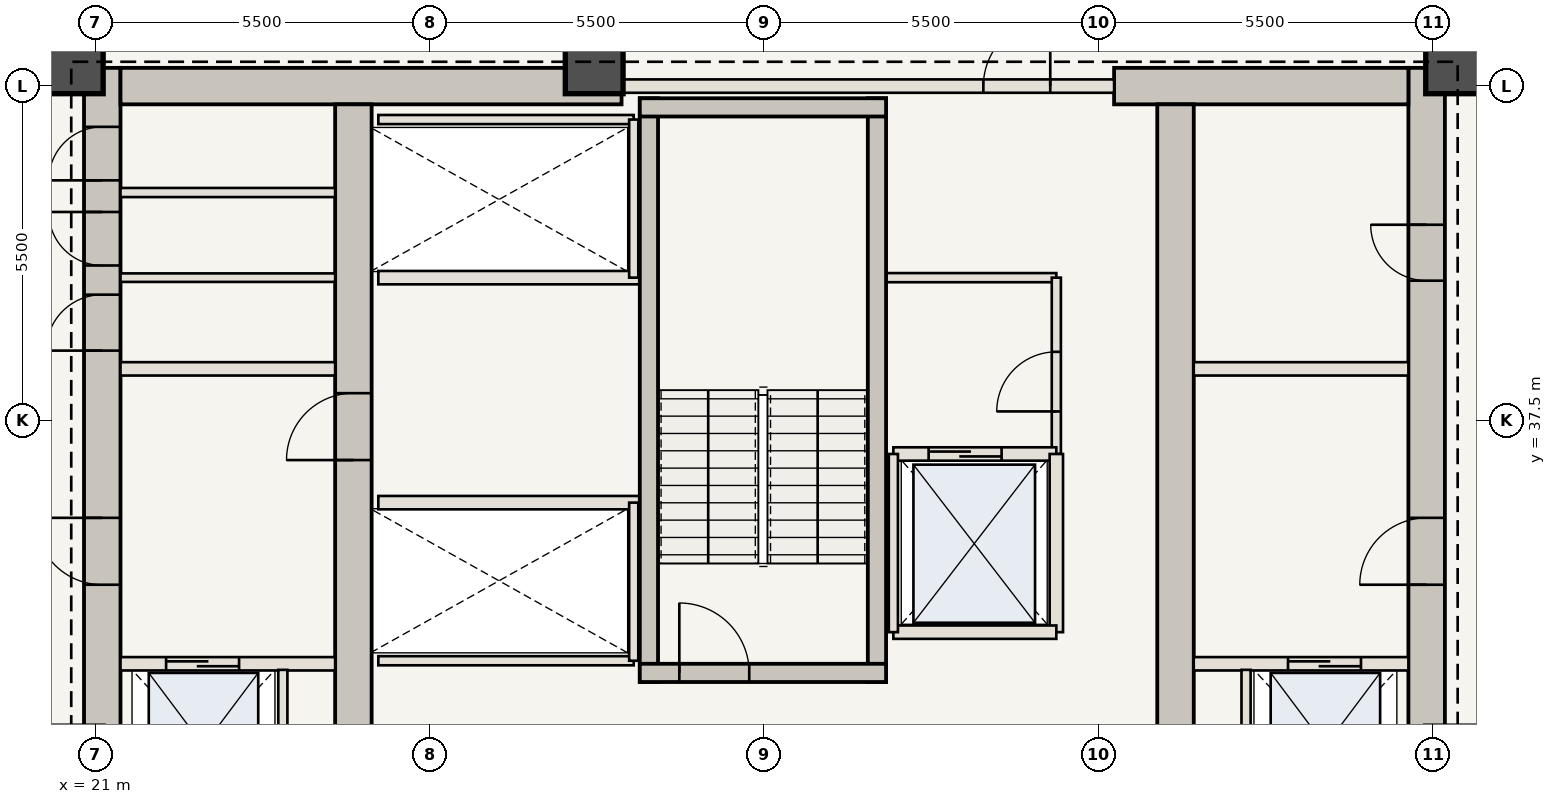
"""IFC4 building model, lengths in metres.
Left out: names, types, materials, properties, quantities, classifications, styles, units other than length and angle.
Written with IfcOpenShell. Run it as: python <this file> out.ifc"""

import sys

from ifc_helpers import new_model, si_unit, direction, frame, frame_2d, origin, origin_2d, place, context, subcontext, project, spatial, rectangle, extrude, element, fill, save


model = new_model("IFC4")
c1 = context("Model", 3, precision=1e-05, world=origin(), true_north=direction((0.0, 1.0)))
c2 = subcontext(c1, "Body", "Model", "MODEL_VIEW")
j1 = project(units=[si_unit("LENGTHUNIT", "METRE"), si_unit("PLANEANGLEUNIT", "RADIAN")], contexts=[c1])
p1 = place(None, origin())
s1 = spatial("IfcSite", under=j1, at=p1, CompositionType="ELEMENT")
p2 = place(p1, origin())
s2 = spatial("IfcBuilding", under=s1, at=p2, CompositionType="ELEMENT")
p3 = place(p2, frame((0.0, 0.0, 145.25)))
s3 = spatial("IfcBuildingStorey", under=s2, at=p3, CompositionType="ELEMENT", Elevation=145.25)
p4 = place(p3, frame((21.11, 30.6, 0.0), z_axis=(0.0, 0.0, 1.0), x_axis=(0.0, 1.0, 0.0)))
e1 = element("IfcWall", 1, at=p4, inside=s3, PredefinedType="SHEAR", context=c2, shape_type="SweptSolid", body=[
    extrude(rectangle(XDim=12.7, YDim=0.6, at=frame_2d((6.35, 0.0))), origin(), (0.0, 0.0, 1.0), 3.85),
])
p5 = place(p4, frame((4.2, 0.0, 0.0)))
e2 = element("IfcOpeningElement", 2, at=p5, cuts=e1, PredefinedType="OPENING", context=c2, shape_type="SweptSolid", body=[
    extrude(rectangle(XDim=1.1, YDim=2.15, at=frame_2d((0.55, 1.075))), frame((0.0, 0.31, 0.0), z_axis=(0.0, -1.0, 0.0), x_axis=(1.0, 0.0, 0.0)), (0.0, 0.0, 1.0), 0.62),
])
p6 = place(p4, frame((8.05, 0.0, 0.0)))
e3 = element("IfcOpeningElement", 3, at=p6, cuts=e1, PredefinedType="OPENING", context=c2, shape_type="SweptSolid", body=[
    extrude(rectangle(XDim=0.92, YDim=2.1, at=frame_2d((0.46, 1.05))), frame((0.0, 0.31, 0.0), z_axis=(0.0, -1.0, 0.0), x_axis=(1.0, 0.0, 0.0)), (0.0, 0.0, 1.0), 0.62),
])
p7 = place(p4, frame((9.45, 0.0, 0.0)))
e4 = element("IfcOpeningElement", 4, at=p7, cuts=e1, PredefinedType="OPENING", context=c2, shape_type="SweptSolid", body=[
    extrude(rectangle(XDim=0.88, YDim=2.1, at=frame_2d((0.44, 1.05))), frame((0.0, 0.31, 0.0), z_axis=(0.0, -1.0, 0.0), x_axis=(1.0, 0.0, 0.0)), (0.0, 0.0, 1.0), 0.62),
])
p8 = place(p4, frame((10.85, 0.0, 0.0)))
e5 = element("IfcOpeningElement", 5, at=p8, cuts=e1, PredefinedType="OPENING", context=c2, shape_type="SweptSolid", body=[
    extrude(rectangle(XDim=0.88, YDim=2.1, at=frame_2d((0.44, 1.05))), frame((0.0, 0.31, 0.0), z_axis=(0.0, -1.0, 0.0), x_axis=(1.0, 0.0, 0.0)), (0.0, 0.0, 1.0), 0.62),
])
p9 = place(p3, frame((42.89, 30.6, 0.0), z_axis=(0.0, 0.0, 1.0), x_axis=(0.0, 1.0, 0.0)))
e6 = element("IfcWall", 6, at=p9, inside=s3, PredefinedType="SHEAR", context=c2, shape_type="SweptSolid", body=[
    extrude(rectangle(XDim=12.7, YDim=0.6, at=frame_2d((6.35, 0.0))), origin(), (0.0, 0.0, 1.0), 3.85),
])
p10 = place(p9, frame((4.2, 0.0, 0.0)))
e7 = element("IfcOpeningElement", 7, at=p10, cuts=e6, PredefinedType="OPENING", context=c2, shape_type="SweptSolid", body=[
    extrude(rectangle(XDim=1.1, YDim=2.15, at=frame_2d((0.55, 1.075))), frame((0.0, 0.31, 0.0), z_axis=(0.0, -1.0, 0.0), x_axis=(1.0, 0.0, 0.0)), (0.0, 0.0, 1.0), 0.62),
])
p11 = place(p9, frame((9.2, 0.0, 0.0)))
e8 = element("IfcOpeningElement", 8, at=p11, cuts=e6, PredefinedType="OPENING", context=c2, shape_type="SweptSolid", body=[
    extrude(rectangle(XDim=0.92, YDim=2.1, at=frame_2d((0.46, 1.05))), frame((0.0, 0.31, 0.0), z_axis=(0.0, -1.0, 0.0), x_axis=(1.0, 0.0, 0.0)), (0.0, 0.0, 1.0), 0.62),
])
p12 = place(p3, frame((21.41, 43.0, 0.0), z_axis=(0.0, 0.0, 1.0), x_axis=(1.0, 0.0, 0.0)))
e9 = element("IfcWall", 9, at=p12, inside=s3, PredefinedType="SHEAR", context=c2, shape_type="SweptSolid", body=[
    extrude(rectangle(XDim=8.24, YDim=0.6, at=frame_2d((4.12, 0.0))), origin(), (0.0, 0.0, 1.0), 3.85),
])
p13 = place(p3, frame((37.75, 43.0, 0.0), z_axis=(0.0, 0.0, 1.0), x_axis=(1.0, 0.0, 0.0)))
e10 = element("IfcWall", 10, at=p13, inside=s3, PredefinedType="SHEAR", context=c2, shape_type="SweptSolid", body=[
    extrude(rectangle(XDim=4.84, YDim=0.6, at=frame_2d((2.42, 0.0))), origin(), (0.0, 0.0, 1.0), 3.85),
])
p14 = place(p3, frame((25.24, 30.6, 0.0), z_axis=(0.0, 0.0, 1.0), x_axis=(0.0, 1.0, 0.0)))
e11 = element("IfcWall", 11, at=p14, inside=s3, PredefinedType="SHEAR", context=c2, shape_type="SweptSolid", body=[
    extrude(rectangle(XDim=12.1, YDim=0.6, at=frame_2d((6.05, 0.0))), origin(), (0.0, 0.0, 1.0), 3.85),
])
p15 = place(p14, frame((6.25, 0.0, 0.0)))
e12 = element("IfcOpeningElement", 12, at=p15, cuts=e11, PredefinedType="OPENING", context=c2, shape_type="SweptSolid", body=[
    extrude(rectangle(XDim=1.1, YDim=2.15, at=frame_2d((0.55, 1.075))), frame((0.0, 0.31, 0.0), z_axis=(0.0, -1.0, 0.0), x_axis=(1.0, 0.0, 0.0)), (0.0, 0.0, 1.0), 0.62),
])
p16 = place(p3, frame((38.76, 30.6, 0.0), z_axis=(0.0, 0.0, 1.0), x_axis=(0.0, 1.0, 0.0)))
e13 = element("IfcWall", 13, at=p16, inside=s3, PredefinedType="SHEAR", context=c2, shape_type="SweptSolid", body=[
    extrude(rectangle(XDim=12.1, YDim=0.6, at=frame_2d((6.05, 0.0))), origin(), (0.0, 0.0, 1.0), 3.85),
])
for number, where, z_axis, x_axis in (
    (14, (43.35, 43.35, 0.0), (0.0, 0.0, 1.0), (1.0, 0.0, 0.0)),
    (15, (29.2, 43.35, 0.0), (0.0, 0.0, 1.0), (1.0, 0.0, 0.0)),
    (16, (20.65, 43.35, 0.0), (0.0, 0.0, 1.0), (1.0, 0.0, 0.0)),
):
    element("IfcColumn", number, at=place(p3, frame(where, z_axis=z_axis, x_axis=x_axis)), inside=s3, PredefinedType="COLUMN", context=c2, shape_type="SweptSolid", body=[
        extrude(rectangle(XDim=0.95, YDim=0.95, at=origin_2d()), origin(), (0.0, 0.0, 1.0), 3.85),
    ])
p17 = place(p3, frame((21.41, 33.5, 0.0), z_axis=(0.0, 0.0, 1.0), x_axis=(1.0, 0.0, 0.0)))
e17 = element("IfcWall", 17, at=p17, inside=s3, PredefinedType="STANDARD", context=c2, shape_type="SweptSolid", body=[
    extrude(rectangle(XDim=3.53, YDim=0.22, at=frame_2d((1.765, 0.0))), origin(), (0.0, 0.0, 1.0), 3.685),
])
p18 = place(p17, frame((0.75, 0.0, 0.0)))
e18 = element("IfcOpeningElement", 18, at=p18, cuts=e17, PredefinedType="OPENING", context=c2, shape_type="SweptSolid", body=[
    extrude(rectangle(XDim=1.2, YDim=2.2, at=frame_2d((0.6, 1.1))), frame((0.0, 0.12, 0.0), z_axis=(0.0, -1.0, 0.0), x_axis=(1.0, 0.0, 0.0)), (0.0, 0.0, 1.0), 0.24),
])
p19 = place(p3, frame((24.08, 30.75, 0.0), z_axis=(0.0, 0.0, 1.0), x_axis=(0.0, 1.0, 0.0)))
e19 = element("IfcWall", 19, at=p19, inside=s3, PredefinedType="STANDARD", context=c2, shape_type="SweptSolid", body=[
    extrude(rectangle(XDim=2.65, YDim=0.15, at=frame_2d((1.325, 0.0))), origin(), (0.0, 0.0, 1.0), 3.685),
])
p20 = place(p3, frame((39.06, 33.5, 0.0), z_axis=(0.0, 0.0, 1.0), x_axis=(1.0, 0.0, 0.0)))
e20 = element("IfcWall", 20, at=p20, inside=s3, PredefinedType="STANDARD", context=c2, shape_type="SweptSolid", body=[
    extrude(rectangle(XDim=3.53, YDim=0.22, at=frame_2d((1.765, 0.0))), origin(), (0.0, 0.0, 1.0), 3.685),
])
p21 = place(p20, frame((1.55, 0.0, 0.0)))
e21 = element("IfcOpeningElement", 21, at=p21, cuts=e20, PredefinedType="OPENING", context=c2, shape_type="SweptSolid", body=[
    extrude(rectangle(XDim=1.2, YDim=2.2, at=frame_2d((0.6, 1.1))), frame((0.0, 0.12, 0.0), z_axis=(0.0, -1.0, 0.0), x_axis=(1.0, 0.0, 0.0)), (0.0, 0.0, 1.0), 0.24),
])
p22 = place(p3, frame((39.92, 30.75, 0.0), z_axis=(0.0, 0.0, 1.0), x_axis=(0.0, 1.0, 0.0)))
e22 = element("IfcWall", 22, at=p22, inside=s3, PredefinedType="STANDARD", context=c2, shape_type="SweptSolid", body=[
    extrude(rectangle(XDim=2.65, YDim=0.15, at=frame_2d((1.325, 0.0))), origin(), (0.0, 0.0, 1.0), 3.685),
])
for number, where, z_axis, x_axis in (
    (23, (21.41, 38.35, 0.0), (0.0, 0.0, 1.0), (1.0, 0.0, 0.0)),
    (24, (39.06, 38.35, 0.0), (0.0, 0.0, 1.0), (1.0, 0.0, 0.0)),
):
    element("IfcWall", number, at=place(p3, frame(where, z_axis=z_axis, x_axis=x_axis)), inside=s3, PredefinedType="STANDARD", context=c2, shape_type="SweptSolid", body=[
        extrude(rectangle(XDim=3.53, YDim=0.22, at=frame_2d((1.765, 0.0))), origin(), (0.0, 0.0, 1.0), 3.685),
    ])
p23 = place(p3, frame((21.41, 39.85, 0.0), z_axis=(0.0, 0.0, 1.0), x_axis=(1.0, 0.0, 0.0)))
e25 = element("IfcWall", 25, at=p23, inside=s3, PredefinedType="STANDARD", context=c2, shape_type="SweptSolid", body=[
    extrude(rectangle(XDim=3.53, YDim=0.14, at=frame_2d((1.765, 0.0))), origin(), (0.0, 0.0, 1.0), 3.685),
])
p24 = place(p3, frame((21.41, 41.25, 0.0), z_axis=(0.0, 0.0, 1.0), x_axis=(1.0, 0.0, 0.0)))
e26 = element("IfcWall", 26, at=p24, inside=s3, PredefinedType="STANDARD", context=c2, shape_type="SweptSolid", body=[
    extrude(rectangle(XDim=3.53, YDim=0.15, at=frame_2d((1.765, 0.0))), origin(), (0.0, 0.0, 1.0), 3.685),
])
p25 = place(p3, frame((34.0, 39.85, 0.0), z_axis=(0.0, 0.0, 1.0), x_axis=(1.0, 0.0, 0.0)))
e27 = element("IfcWall", 27, at=p25, inside=s3, PredefinedType="STANDARD", context=c2, shape_type="SweptSolid", body=[
    extrude(rectangle(XDim=2.8, YDim=0.15, at=frame_2d((1.4, 0.0))), origin(), (0.0, 0.0, 1.0), 3.685),
])
p26 = place(p3, frame((36.8, 36.95, 0.0), z_axis=(0.0, 0.0, 1.0), x_axis=(0.0, 1.0, 0.0)))
e28 = element("IfcWall", 28, at=p26, inside=s3, PredefinedType="STANDARD", context=c2, shape_type="SweptSolid", body=[
    extrude(rectangle(XDim=2.9, YDim=0.15, at=frame_2d((1.45, 0.0))), origin(), (0.0, 0.0, 1.0), 3.685),
])
p27 = place(p26, frame((0.7, 0.0, 0.0)))
e29 = element("IfcOpeningElement", 29, at=p27, cuts=e28, PredefinedType="OPENING", context=c2, shape_type="SweptSolid", body=[
    extrude(rectangle(XDim=0.98, YDim=2.2, at=frame_2d((0.49, 1.1))), frame((0.0, 0.085, 0.0), z_axis=(0.0, -1.0, 0.0), x_axis=(1.0, 0.0, 0.0)), (0.0, 0.0, 1.0), 0.17),
])
p28 = place(p3, frame((25.65, 36.15, 0.0), z_axis=(0.0, 0.0, 1.0), x_axis=(1.0, 0.0, 0.0)))
e30 = element("IfcWall", 30, at=p28, inside=s3, PredefinedType="STANDARD", context=c2, shape_type="SweptSolid", body=[
    extrude(rectangle(XDim=4.3, YDim=0.22, at=frame_2d((2.15, 0.0))), origin(), (0.0, 0.0, 1.0), 3.685),
])
p29 = place(p3, frame((25.65, 33.55, 0.0), z_axis=(0.0, 0.0, 1.0), x_axis=(1.0, 0.0, 0.0)))
e31 = element("IfcWall", 31, at=p29, inside=s3, PredefinedType="STANDARD", context=c2, shape_type="SweptSolid", body=[
    extrude(rectangle(XDim=4.2, YDim=0.15, at=frame_2d((2.1, 0.0))), origin(), (0.0, 0.0, 1.0), 3.685),
])
p30 = place(p3, frame((29.85, 33.55, 0.0), z_axis=(0.0, 0.0, 1.0), x_axis=(0.0, 1.0, 0.0)))
e32 = element("IfcWall", 32, at=p30, inside=s3, PredefinedType="STANDARD", context=c2, shape_type="SweptSolid", body=[
    extrude(rectangle(XDim=2.6, YDim=0.15, at=frame_2d((1.3, 0.0))), origin(), (0.0, 0.0, 1.0), 3.685),
])
p31 = place(p3, frame((25.65, 39.85, 0.0), z_axis=(0.0, 0.0, 1.0), x_axis=(1.0, 0.0, 0.0)))
e33 = element("IfcWall", 33, at=p31, inside=s3, PredefinedType="STANDARD", context=c2, shape_type="SweptSolid", body=[
    extrude(rectangle(XDim=4.3, YDim=0.22, at=frame_2d((2.15, 0.0))), origin(), (0.0, 0.0, 1.0), 3.685),
])
p32 = place(p3, frame((25.65, 42.45, 0.0), z_axis=(0.0, 0.0, 1.0), x_axis=(1.0, 0.0, 0.0)))
e34 = element("IfcWall", 34, at=p32, inside=s3, PredefinedType="STANDARD", context=c2, shape_type="SweptSolid", body=[
    extrude(rectangle(XDim=4.2, YDim=0.15, at=frame_2d((2.1, 0.0))), origin(), (0.0, 0.0, 1.0), 3.685),
])
p33 = place(p3, frame((29.85, 39.85, 0.0), z_axis=(0.0, 0.0, 1.0), x_axis=(0.0, 1.0, 0.0)))
e35 = element("IfcWall", 35, at=p33, inside=s3, PredefinedType="STANDARD", context=c2, shape_type="SweptSolid", body=[
    extrude(rectangle(XDim=2.6, YDim=0.15, at=frame_2d((1.3, 0.0))), origin(), (0.0, 0.0, 1.0), 3.685),
])
for number, where, z_axis, x_axis in (
    (36, (30.1, 33.2, 0.0), (0.0, 0.0, 1.0), (0.0, 1.0, 0.0)),
    (37, (33.85, 33.2, 0.0), (0.0, 0.0, 1.0), (0.0, 1.0, 0.0)),
):
    element("IfcWall", number, at=place(p3, frame(where, z_axis=z_axis, x_axis=x_axis)), inside=s3, PredefinedType="SHEAR", context=c2, shape_type="SweptSolid", body=[
        extrude(rectangle(XDim=9.6, YDim=0.3, at=frame_2d((4.8, 0.0))), origin(), (0.0, 0.0, 1.0), 3.685),
    ])
p34 = place(p3, frame((29.95, 33.35, 0.0), z_axis=(0.0, 0.0, 1.0), x_axis=(1.0, 0.0, 0.0)))
e38 = element("IfcWall", 38, at=p34, inside=s3, PredefinedType="SHEAR", context=c2, shape_type="SweptSolid", body=[
    extrude(rectangle(XDim=4.05, YDim=0.3, at=frame_2d((2.025, 0.0))), origin(), (0.0, 0.0, 1.0), 3.685),
])
p35 = place(p34, frame((0.65, 0.0, 0.0)))
e39 = element("IfcOpeningElement", 39, at=p35, cuts=e38, PredefinedType="OPENING", context=c2, shape_type="SweptSolid", body=[
    extrude(rectangle(XDim=1.15, YDim=2.15, at=frame_2d((0.575, 1.075))), frame((0.0, 0.16, 0.0), z_axis=(0.0, -1.0, 0.0), x_axis=(1.0, 0.0, 0.0)), (0.0, 0.0, 1.0), 0.32),
])
p36 = place(p3, frame((29.95, 42.65, 0.0), z_axis=(0.0, 0.0, 1.0), x_axis=(1.0, 0.0, 0.0)))
e40 = element("IfcWall", 40, at=p36, inside=s3, PredefinedType="SHEAR", context=c2, shape_type="SweptSolid", body=[
    extrude(rectangle(XDim=4.05, YDim=0.3, at=frame_2d((2.025, 0.0))), origin(), (0.0, 0.0, 1.0), 3.685),
])
p37 = place(p3, frame((29.65, 43.0, 0.0), z_axis=(0.0, 0.0, 1.0), x_axis=(1.0, 0.0, 0.0)))
e41 = element("IfcWall", 41, at=p37, inside=s3, PredefinedType="STANDARD", context=c2, shape_type="SweptSolid", body=[
    extrude(rectangle(XDim=8.1, YDim=0.22, at=frame_2d((4.05, 0.0))), origin(), (0.0, 0.0, 1.0), 3.685),
])
p38 = place(p37, frame((5.95, 0.0, 0.0)))
e42 = element("IfcOpeningElement", 42, at=p38, cuts=e41, PredefinedType="OPENING", context=c2, shape_type="SweptSolid", body=[
    extrude(rectangle(XDim=1.1, YDim=2.15, at=frame_2d((0.55, 1.075))), frame((0.0, 0.12, 0.0), z_axis=(0.0, -1.0, 0.0), x_axis=(1.0, 0.0, 0.0)), (0.0, 0.0, 1.0), 0.24),
])
p39 = place(p3, frame((34.12, 36.95, 0.0), z_axis=(0.0, 0.0, 1.0), x_axis=(1.0, 0.0, 0.0)))
e43 = element("IfcWall", 43, at=p39, inside=s3, PredefinedType="STANDARD", context=c2, shape_type="SweptSolid", body=[
    extrude(rectangle(XDim=2.68, YDim=0.22, at=frame_2d((1.34, 0.0))), origin(), (0.0, 0.0, 1.0), 3.685),
])
p40 = place(p39, frame((0.58, 0.0, 0.0)))
e44 = element("IfcOpeningElement", 44, at=p40, cuts=e43, PredefinedType="OPENING", context=c2, shape_type="SweptSolid", body=[
    extrude(rectangle(XDim=1.2, YDim=2.2, at=frame_2d((0.6, 1.1))), frame((0.0, 0.12, 0.0), z_axis=(0.0, -1.0, 0.0), x_axis=(1.0, 0.0, 0.0)), (0.0, 0.0, 1.0), 0.24),
])
p41 = place(p3, frame((36.8, 34.02, 0.0), z_axis=(0.0, 0.0, 1.0), x_axis=(0.0, 1.0, 0.0)))
e45 = element("IfcWall", 45, at=p41, inside=s3, PredefinedType="STANDARD", context=c2, shape_type="SweptSolid", body=[
    extrude(rectangle(XDim=2.93, YDim=0.22, at=frame_2d((1.465, 0.0))), origin(), (0.0, 0.0, 1.0), 3.685),
])
p42 = place(p3, frame((34.12, 34.02, 0.0), z_axis=(0.0, 0.0, 1.0), x_axis=(1.0, 0.0, 0.0)))
e46 = element("IfcWall", 46, at=p42, inside=s3, PredefinedType="STANDARD", context=c2, shape_type="SweptSolid", body=[
    extrude(rectangle(XDim=2.68, YDim=0.22, at=frame_2d((1.34, 0.0))), origin(), (0.0, 0.0, 1.0), 3.685),
])
p43 = place(p3, frame((34.12, 34.02, 0.0), z_axis=(0.0, 0.0, 1.0), x_axis=(0.0, 1.0, 0.0)))
e47 = element("IfcWall", 47, at=p43, inside=s3, PredefinedType="STANDARD", context=c2, shape_type="SweptSolid", body=[
    extrude(rectangle(XDim=2.93, YDim=0.15, at=frame_2d((1.465, 0.0))), origin(), (0.0, 0.0, 1.0), 3.685),
])
p44 = place(p5, origin())
e48 = element("IfcDoor", 48, at=p44, inside=s3, OperationType="SINGLE_SWING_RIGHT", PredefinedType="DOOR", context=c2, shape_type="SweptSolid", body=[
    extrude(rectangle(XDim=1.1, YDim=2.15, at=frame_2d((0.55, 1.075))), frame((0.0, 0.025, 0.0), z_axis=(0.0, -1.0, 0.0), x_axis=(1.0, 0.0, 0.0)), (0.0, 0.0, 1.0), 0.05),
])
fill(e2, e48)
p45 = place(p10, origin())
e49 = element("IfcDoor", 49, at=p45, inside=s3, OperationType="SINGLE_SWING_LEFT", PredefinedType="DOOR", context=c2, shape_type="SweptSolid", body=[
    extrude(rectangle(XDim=1.1, YDim=2.15, at=frame_2d((0.55, 1.075))), frame((0.0, 0.025, 0.0), z_axis=(0.0, -1.0, 0.0), x_axis=(1.0, 0.0, 0.0)), (0.0, 0.0, 1.0), 0.05),
])
fill(e7, e49)
p46 = place(p15, origin())
e50 = element("IfcDoor", 50, at=p46, inside=s3, OperationType="SINGLE_SWING_LEFT", PredefinedType="DOOR", context=c2, shape_type="SweptSolid", body=[
    extrude(rectangle(XDim=1.1, YDim=2.15, at=frame_2d((0.55, 1.075))), frame((0.0, 0.025, 0.0), z_axis=(0.0, -1.0, 0.0), x_axis=(1.0, 0.0, 0.0)), (0.0, 0.0, 1.0), 0.05),
])
fill(e12, e50)
p47 = place(p6, origin())
e51 = element("IfcDoor", 51, at=p47, inside=s3, OperationType="SINGLE_SWING_LEFT", PredefinedType="DOOR", context=c2, shape_type="SweptSolid", body=[
    extrude(rectangle(XDim=0.92, YDim=2.1, at=frame_2d((0.46, 1.05))), frame((0.0, 0.025, 0.0), z_axis=(0.0, -1.0, 0.0), x_axis=(1.0, 0.0, 0.0)), (0.0, 0.0, 1.0), 0.05),
])
fill(e3, e51)
p48 = place(p7, origin())
e52 = element("IfcDoor", 52, at=p48, inside=s3, OperationType="SINGLE_SWING_RIGHT", PredefinedType="DOOR", context=c2, shape_type="SweptSolid", body=[
    extrude(rectangle(XDim=0.88, YDim=2.1, at=frame_2d((0.44, 1.05))), frame((0.0, 0.025, 0.0), z_axis=(0.0, -1.0, 0.0), x_axis=(1.0, 0.0, 0.0)), (0.0, 0.0, 1.0), 0.05),
])
fill(e4, e52)
p49 = place(p8, origin())
e53 = element("IfcDoor", 53, at=p49, inside=s3, OperationType="SINGLE_SWING_LEFT", PredefinedType="DOOR", context=c2, shape_type="SweptSolid", body=[
    extrude(rectangle(XDim=0.88, YDim=2.1, at=frame_2d((0.44, 1.05))), frame((0.0, 0.025, 0.0), z_axis=(0.0, -1.0, 0.0), x_axis=(1.0, 0.0, 0.0)), (0.0, 0.0, 1.0), 0.05),
])
fill(e5, e53)
p50 = place(p11, origin())
e54 = element("IfcDoor", 54, at=p50, inside=s3, OperationType="SINGLE_SWING_RIGHT", PredefinedType="DOOR", context=c2, shape_type="SweptSolid", body=[
    extrude(rectangle(XDim=0.92, YDim=2.1, at=frame_2d((0.46, 1.05))), frame((0.0, 0.025, 0.0), z_axis=(0.0, -1.0, 0.0), x_axis=(1.0, 0.0, 0.0)), (0.0, 0.0, 1.0), 0.05),
])
fill(e8, e54)
p51 = place(p18, origin())
e55 = element("IfcDoor", 55, at=p51, inside=s3, OperationType="DOUBLE_DOOR_SLIDING", PredefinedType="DOOR", context=c2, shape_type="SweptSolid", body=[
    extrude(rectangle(XDim=1.2, YDim=2.2, at=frame_2d((0.6, 1.1))), frame((0.0, 0.025, 0.0), z_axis=(0.0, -1.0, 0.0), x_axis=(1.0, 0.0, 0.0)), (0.0, 0.0, 1.0), 0.05),
])
fill(e18, e55)
p52 = place(p21, origin())
e56 = element("IfcDoor", 56, at=p52, inside=s3, OperationType="DOUBLE_DOOR_SLIDING", PredefinedType="DOOR", context=c2, shape_type="SweptSolid", body=[
    extrude(rectangle(XDim=1.2, YDim=2.2, at=frame_2d((0.6, 1.1))), frame((0.0, 0.025, 0.0), z_axis=(0.0, -1.0, 0.0), x_axis=(1.0, 0.0, 0.0)), (0.0, 0.0, 1.0), 0.05),
])
fill(e21, e56)
p53 = place(p27, origin())
e57 = element("IfcDoor", 57, at=p53, inside=s3, OperationType="SINGLE_SWING_LEFT", PredefinedType="DOOR", context=c2, shape_type="SweptSolid", body=[
    extrude(rectangle(XDim=0.98, YDim=2.2, at=frame_2d((0.49, 1.1))), frame((0.0, 0.025, 0.0), z_axis=(0.0, -1.0, 0.0), x_axis=(1.0, 0.0, 0.0)), (0.0, 0.0, 1.0), 0.05),
])
fill(e29, e57)
p54 = place(p35, origin())
e58 = element("IfcDoor", 58, at=p54, inside=s3, OperationType="SINGLE_SWING_LEFT", PredefinedType="DOOR", context=c2, shape_type="SweptSolid", body=[
    extrude(rectangle(XDim=1.15, YDim=2.15, at=frame_2d((0.575, 1.075))), frame((0.0, 0.025, 0.0), z_axis=(0.0, -1.0, 0.0), x_axis=(1.0, 0.0, 0.0)), (0.0, 0.0, 1.0), 0.05),
])
fill(e39, e58)
p55 = place(p38, origin())
e59 = element("IfcDoor", 59, at=p55, inside=s3, OperationType="SINGLE_SWING_RIGHT", PredefinedType="DOOR", context=c2, shape_type="SweptSolid", body=[
    extrude(rectangle(XDim=1.1, YDim=2.15, at=frame_2d((0.55, 1.075))), frame((0.0, 0.025, 0.0), z_axis=(0.0, -1.0, 0.0), x_axis=(1.0, 0.0, 0.0)), (0.0, 0.0, 1.0), 0.05),
])
fill(e42, e59)
p56 = place(p40, origin())
e60 = element("IfcDoor", 60, at=p56, inside=s3, OperationType="DOUBLE_DOOR_SLIDING", PredefinedType="DOOR", context=c2, shape_type="SweptSolid", body=[
    extrude(rectangle(XDim=1.2, YDim=2.2, at=frame_2d((0.6, 1.1))), frame((0.0, 0.025, 0.0), z_axis=(0.0, -1.0, 0.0), x_axis=(1.0, 0.0, 0.0)), (0.0, 0.0, 1.0), 0.05),
])
fill(e44, e60)
save(model, sys.argv[1])
